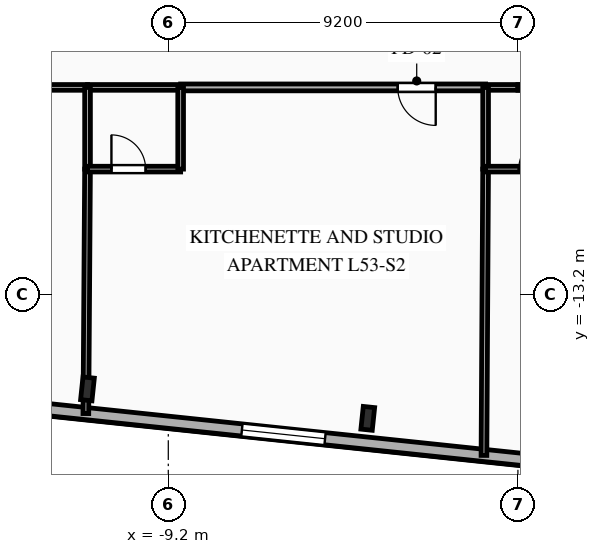
"""IFC4 building model, lengths in metres.
Left out: names, types, materials, properties, quantities, classifications, styles, units other than length and angle.
Written with IfcOpenShell. Run it as: python <this file> out.ifc"""

import sys

from ifc_helpers import new_model, si_unit, direction, frame, frame_2d, origin, origin_2d, place, context, subcontext, project, spatial, rectangle, i_section, extrude, element, fill, save


model = new_model("IFC4")
c1 = context("Model", 3, precision=1e-05, world=origin(), true_north=direction((0.0, 1.0)))
c2 = subcontext(c1, "Body", "Model", "MODEL_VIEW")
j1 = project(units=[si_unit("LENGTHUNIT", "METRE"), si_unit("PLANEANGLEUNIT", "RADIAN")], contexts=[c1])
p1 = place(None, origin())
s1 = spatial("IfcSite", under=j1, at=p1, CompositionType="ELEMENT")
p2 = place(p1, origin())
s2 = spatial("IfcBuilding", under=s1, at=p2, CompositionType="ELEMENT")
p3 = place(p2, frame((0.0, 0.0, 189.7)))
s3 = spatial("IfcBuildingStorey", under=s2, at=p3, CompositionType="ELEMENT", Elevation=189.7)
for number, where, z_axis, x_axis in (
    (1, (-11.327, -15.683, 0.0), (0.0, 0.0, 1.0), (0.995, -0.105, 0.0)),
    (2, (-3.951, -16.458, 0.0), (0.0, 0.0, 1.0), (0.995, -0.105, 0.0)),
):
    element("IfcColumn", number, at=place(p3, frame(where, z_axis=z_axis, x_axis=x_axis)), inside=s3, PredefinedType="COLUMN", context=c2, shape_type="SweptSolid", body=[
        extrude(i_section(OverallWidth=0.3, OverallDepth=0.6, WebThickness=0.015, FlangeThickness=0.03, FilletRadius=0.027, at=origin_2d()), origin(), (0.0, 0.0, 1.0), 3.35),
    ])
p4 = place(p3, frame((18.756, -19.498, 0.0), z_axis=(0.0, 0.0, 1.0), x_axis=(-0.994522060044, 0.104526896475, 0.0)))
e3 = element("IfcWall", 3, at=p4, inside=s3, PredefinedType="SOLIDWALL", context=c2, shape_type="SweptSolid", body=[
    extrude(rectangle(XDim=45.8, YDim=0.32, at=frame_2d((22.9, 0.0))), origin(), (0.0, 0.0, 1.0), 3.04),
])
p5 = place(p4, frame((1.217, 0.0, 0.85)))
e4 = element("IfcOpeningElement", 4, at=p5, cuts=e3, PredefinedType="OPENING", context=c2, shape_type="SweptSolid", body=[
    extrude(rectangle(XDim=1.65, YDim=1.85, at=frame_2d((0.825, 0.925))), frame((0.0, 0.17, 0.0), z_axis=(0.0, -1.0, 0.0), x_axis=(1.0, 0.0, 0.0)), (0.0, 0.0, 1.0), 0.34),
])
p6 = place(p4, frame((5.621, 0.0, 0.85)))
e5 = element("IfcOpeningElement", 5, at=p6, cuts=e3, PredefinedType="OPENING", context=c2, shape_type="SweptSolid", body=[
    extrude(rectangle(XDim=1.65, YDim=1.85, at=frame_2d((0.825, 0.925))), frame((0.0, 0.17, 0.0), z_axis=(0.0, -1.0, 0.0), x_axis=(1.0, 0.0, 0.0)), (0.0, 0.0, 1.0), 0.34),
])
p7 = place(p4, frame((13.433, 0.0, 0.85)))
e6 = element("IfcOpeningElement", 6, at=p7, cuts=e3, PredefinedType="OPENING", context=c2, shape_type="SweptSolid", body=[
    extrude(rectangle(XDim=2.2, YDim=1.85, at=frame_2d((1.1, 0.925))), frame((0.0, 0.17, 0.0), z_axis=(0.0, -1.0, 0.0), x_axis=(1.0, 0.0, 0.0)), (0.0, 0.0, 1.0), 0.34),
])
p8 = place(p4, frame((23.962, 0.0, 0.85)))
e7 = element("IfcOpeningElement", 7, at=p8, cuts=e3, PredefinedType="OPENING", context=c2, shape_type="SweptSolid", body=[
    extrude(rectangle(XDim=2.2, YDim=1.85, at=frame_2d((1.1, 0.925))), frame((0.0, 0.17, 0.0), z_axis=(0.0, -1.0, 0.0), x_axis=(1.0, 0.0, 0.0)), (0.0, 0.0, 1.0), 0.34),
])
p9 = place(p4, frame((34.366, 0.0, 0.85)))
e8 = element("IfcOpeningElement", 8, at=p9, cuts=e3, PredefinedType="OPENING", context=c2, shape_type="SweptSolid", body=[
    extrude(rectangle(XDim=1.65, YDim=1.85, at=frame_2d((0.825, 0.925))), frame((0.0, 0.17, 0.0), z_axis=(0.0, -1.0, 0.0), x_axis=(1.0, 0.0, 0.0)), (0.0, 0.0, 1.0), 0.34),
])
p10 = place(p4, frame((41.892, 0.0, 0.85)))
e9 = element("IfcOpeningElement", 9, at=p10, cuts=e3, PredefinedType="OPENING", context=c2, shape_type="SweptSolid", body=[
    extrude(rectangle(XDim=1.65, YDim=1.85, at=frame_2d((0.825, 0.925))), frame((0.0, 0.17, 0.0), z_axis=(0.0, -1.0, 0.0), x_axis=(1.0, 0.0, 0.0)), (0.0, 0.0, 1.0), 0.34),
])
p11 = place(p3, frame((-11.325, -7.75, 0.0), z_axis=(0.0, 0.0, 1.0), x_axis=(-1.0, 0.0, 0.0)))
e10 = element("IfcWall", 10, at=p11, inside=s3, PredefinedType="PARTITIONING", context=c2, shape_type="SweptSolid", body=[
    extrude(rectangle(XDim=9.625, YDim=0.15, at=frame_2d((4.812, 0.0))), origin(), (0.0, 0.0, 1.0), 3.04),
])
p12 = place(p11, frame((2.434, 0.0, 0.0)))
e11 = element("IfcOpeningElement", 11, at=p12, cuts=e10, PredefinedType="OPENING", context=c2, shape_type="SweptSolid", body=[
    extrude(rectangle(XDim=1.05, YDim=2.15, at=frame_2d((0.525, 1.075))), frame((0.0, 0.085, 0.0), z_axis=(0.0, -1.0, 0.0), x_axis=(1.0, 0.0, 0.0)), (0.0, 0.0, 1.0), 0.17),
])
p13 = place(p3, frame((-0.85, -7.75, 0.0), z_axis=(0.0, 0.0, 1.0), x_axis=(-1.0, 0.0, 0.0)))
e12 = element("IfcWall", 12, at=p13, inside=s3, PredefinedType="PARTITIONING", context=c2, shape_type="SweptSolid", body=[
    extrude(rectangle(XDim=8.025, YDim=0.18, at=frame_2d((4.012, 0.0))), origin(), (0.0, 0.0, 1.0), 3.04),
])
p14 = place(p13, frame((1.313, 0.0, 0.0)))
e13 = element("IfcOpeningElement", 13, at=p14, cuts=e12, PredefinedType="OPENING", context=c2, shape_type="SweptSolid", body=[
    extrude(rectangle(XDim=1.0, YDim=2.15, at=frame_2d((0.5, 1.075))), frame((0.0, 0.1, 0.0), z_axis=(0.0, -1.0, 0.0), x_axis=(1.0, 0.0, 0.0)), (0.0, 0.0, 1.0), 0.2),
])
p15 = place(p3, frame((-8.875, -7.75, 0.0), z_axis=(0.0, 0.0, 1.0), x_axis=(-1.0, 0.0, 0.0)))
e14 = element("IfcWall", 14, at=p15, inside=s3, PredefinedType="PLUMBINGWALL", context=c2, shape_type="SweptSolid", body=[
    extrude(rectangle(XDim=2.45, YDim=0.15, at=frame_2d((1.225, 0.0))), origin(), (0.0, 0.0, 1.0), 3.04),
])
p16 = place(p3, frame((0.0, -7.75, 0.0), z_axis=(0.0, 0.0, 1.0), x_axis=(-1.0, 0.0, 0.0)))
e15 = element("IfcWall", 15, at=p16, inside=s3, PredefinedType="PLUMBINGWALL", context=c2, shape_type="SweptSolid", body=[
    extrude(rectangle(XDim=0.85, YDim=0.15, at=frame_2d((0.425, 0.0))), origin(), (0.0, 0.0, 1.0), 3.04),
])
p17 = place(p3, frame((1.6, -7.75, 0.0), z_axis=(0.0, 0.0, 1.0), x_axis=(-1.0, 0.0, 0.0)))
e16 = element("IfcWall", 16, at=p17, inside=s3, PredefinedType="PLUMBINGWALL", context=c2, shape_type="SweptSolid", body=[
    extrude(rectangle(XDim=1.6, YDim=0.15, at=frame_2d((0.8, 0.0))), origin(), (0.0, 0.0, 1.0), 3.04),
])
p18 = place(p3, frame((-11.325, -9.9, 0.0), z_axis=(0.0, 0.0, 1.0), x_axis=(-0.006831737937, -0.999976663406, 0.0)))
e17 = element("IfcWall", 17, at=p18, inside=s3, PredefinedType="PARTITIONING", context=c2, shape_type="SweptSolid", body=[
    extrude(rectangle(XDim=6.433, YDim=0.15, at=frame_2d((3.216, 0.0))), origin(), (0.0, 0.0, 1.0), 2.665),
])
p19 = place(p3, frame((-11.325, -7.75, 0.0), z_axis=(0.0, 0.0, 1.0), x_axis=(0.0, -1.0, 0.0)))
e18 = element("IfcWall", 18, at=p19, inside=s3, PredefinedType="PLUMBINGWALL", context=c2, shape_type="SweptSolid", body=[
    extrude(rectangle(XDim=2.15, YDim=0.15, at=frame_2d((1.075, 0.0))), origin(), (0.0, 0.0, 1.0), 3.04),
])
p20 = place(p3, frame((-11.325, -9.9, 0.0), z_axis=(0.0, 0.0, 1.0), x_axis=(1.0, 0.0, 0.0)))
e19 = element("IfcWall", 19, at=p20, inside=s3, PredefinedType="PLUMBINGWALL", context=c2, shape_type="SweptSolid", body=[
    extrude(rectangle(XDim=2.45, YDim=0.15, at=frame_2d((1.225, 0.0))), origin(), (0.0, 0.0, 1.0), 3.04),
])
p21 = place(p20, frame((0.629, 0.0, 0.0)))
e20 = element("IfcOpeningElement", 20, at=p21, cuts=e19, PredefinedType="OPENING", context=c2, shape_type="SweptSolid", body=[
    extrude(rectangle(XDim=0.9, YDim=2.1, at=frame_2d((0.45, 1.05))), frame((0.0, 0.085, 0.0), z_axis=(0.0, -1.0, 0.0), x_axis=(1.0, 0.0, 0.0)), (0.0, 0.0, 1.0), 0.17),
])
p22 = place(p3, frame((-8.875, -9.9, 0.0), z_axis=(0.0, 0.0, 1.0), x_axis=(0.0, 1.0, 0.0)))
e21 = element("IfcWall", 21, at=p22, inside=s3, PredefinedType="PLUMBINGWALL", context=c2, shape_type="SweptSolid", body=[
    extrude(rectangle(XDim=2.15, YDim=0.15, at=frame_2d((1.075, 0.0))), origin(), (0.0, 0.0, 1.0), 3.04),
])
p23 = place(p3, frame((-0.85, -9.9, 0.0), z_axis=(0.0, 0.0, 1.0), x_axis=(-0.005801043172, -0.999983173807, 0.0)))
e22 = element("IfcWall", 22, at=p23, inside=s3, PredefinedType="PARTITIONING", context=c2, shape_type="SweptSolid", body=[
    extrude(rectangle(XDim=7.533, YDim=0.15, at=frame_2d((3.767, 0.0))), origin(), (0.0, 0.0, 1.0), 3.04),
])
p24 = place(p3, frame((-0.85, -7.75, 0.0), z_axis=(0.0, 0.0, 1.0), x_axis=(0.0, -1.0, 0.0)))
e23 = element("IfcWall", 23, at=p24, inside=s3, PredefinedType="PLUMBINGWALL", context=c2, shape_type="SweptSolid", body=[
    extrude(rectangle(XDim=2.15, YDim=0.15, at=frame_2d((1.075, 0.0))), origin(), (0.0, 0.0, 1.0), 3.04),
])
p25 = place(p3, frame((-0.85, -9.9, 0.0), z_axis=(0.0, 0.0, 1.0), x_axis=(1.0, 0.0, 0.0)))
e24 = element("IfcWall", 24, at=p25, inside=s3, PredefinedType="PLUMBINGWALL", context=c2, shape_type="SweptSolid", body=[
    extrude(rectangle(XDim=2.45, YDim=0.15, at=frame_2d((1.225, 0.0))), origin(), (0.0, 0.0, 1.0), 3.04),
])
p26 = place(p25, frame((0.873, 0.0, 0.0)))
e25 = element("IfcOpeningElement", 25, at=p26, cuts=e24, PredefinedType="OPENING", context=c2, shape_type="SweptSolid", body=[
    extrude(rectangle(XDim=0.9, YDim=2.1, at=frame_2d((0.45, 1.05))), frame((0.0, 0.085, 0.0), z_axis=(0.0, -1.0, 0.0), x_axis=(1.0, 0.0, 0.0)), (0.0, 0.0, 1.0), 0.17),
])
p27 = place(p8, origin())
e26 = element("IfcWindow", 26, at=p27, inside=s3, PartitioningType="SINGLE_PANEL", PredefinedType="WINDOW", context=c2, shape_type="SweptSolid", body=[
    extrude(rectangle(XDim=2.2, YDim=1.85, at=frame_2d((1.1, 0.925))), frame((0.0, 0.03, 0.0), z_axis=(0.0, -1.0, 0.0), x_axis=(1.0, 0.0, 0.0)), (0.0, 0.0, 1.0), 0.06),
])
fill(e7, e26)
p28 = place(p14, origin())
e27 = element("IfcDoor", 27, at=p28, inside=s3, OperationType="SINGLE_SWING_LEFT", PredefinedType="DOOR", context=c2, shape_type="SweptSolid", body=[
    extrude(rectangle(XDim=1.0, YDim=2.15, at=frame_2d((0.5, 1.075))), frame((0.0, 0.025, 0.0), z_axis=(0.0, -1.0, 0.0), x_axis=(1.0, 0.0, 0.0)), (0.0, 0.0, 1.0), 0.05),
])
fill(e13, e27)
p29 = place(p21, origin())
e28 = element("IfcDoor", 28, at=p29, inside=s3, OperationType="SINGLE_SWING_LEFT", PredefinedType="DOOR", context=c2, shape_type="SweptSolid", body=[
    extrude(rectangle(XDim=0.9, YDim=2.1, at=frame_2d((0.45, 1.05))), frame((0.0, 0.025, 0.0), z_axis=(0.0, -1.0, 0.0), x_axis=(1.0, 0.0, 0.0)), (0.0, 0.0, 1.0), 0.05),
])
fill(e20, e28)
p30 = place(p26, origin())
e29 = element("IfcDoor", 29, at=p30, inside=s3, OperationType="SINGLE_SWING_RIGHT", PredefinedType="DOOR", context=c2, shape_type="SweptSolid", body=[
    extrude(rectangle(XDim=0.9, YDim=2.1, at=frame_2d((0.45, 1.05))), frame((0.0, 0.025, 0.0), z_axis=(0.0, -1.0, 0.0), x_axis=(1.0, 0.0, 0.0)), (0.0, 0.0, 1.0), 0.05),
])
fill(e25, e29)
save(model, sys.argv[1])
